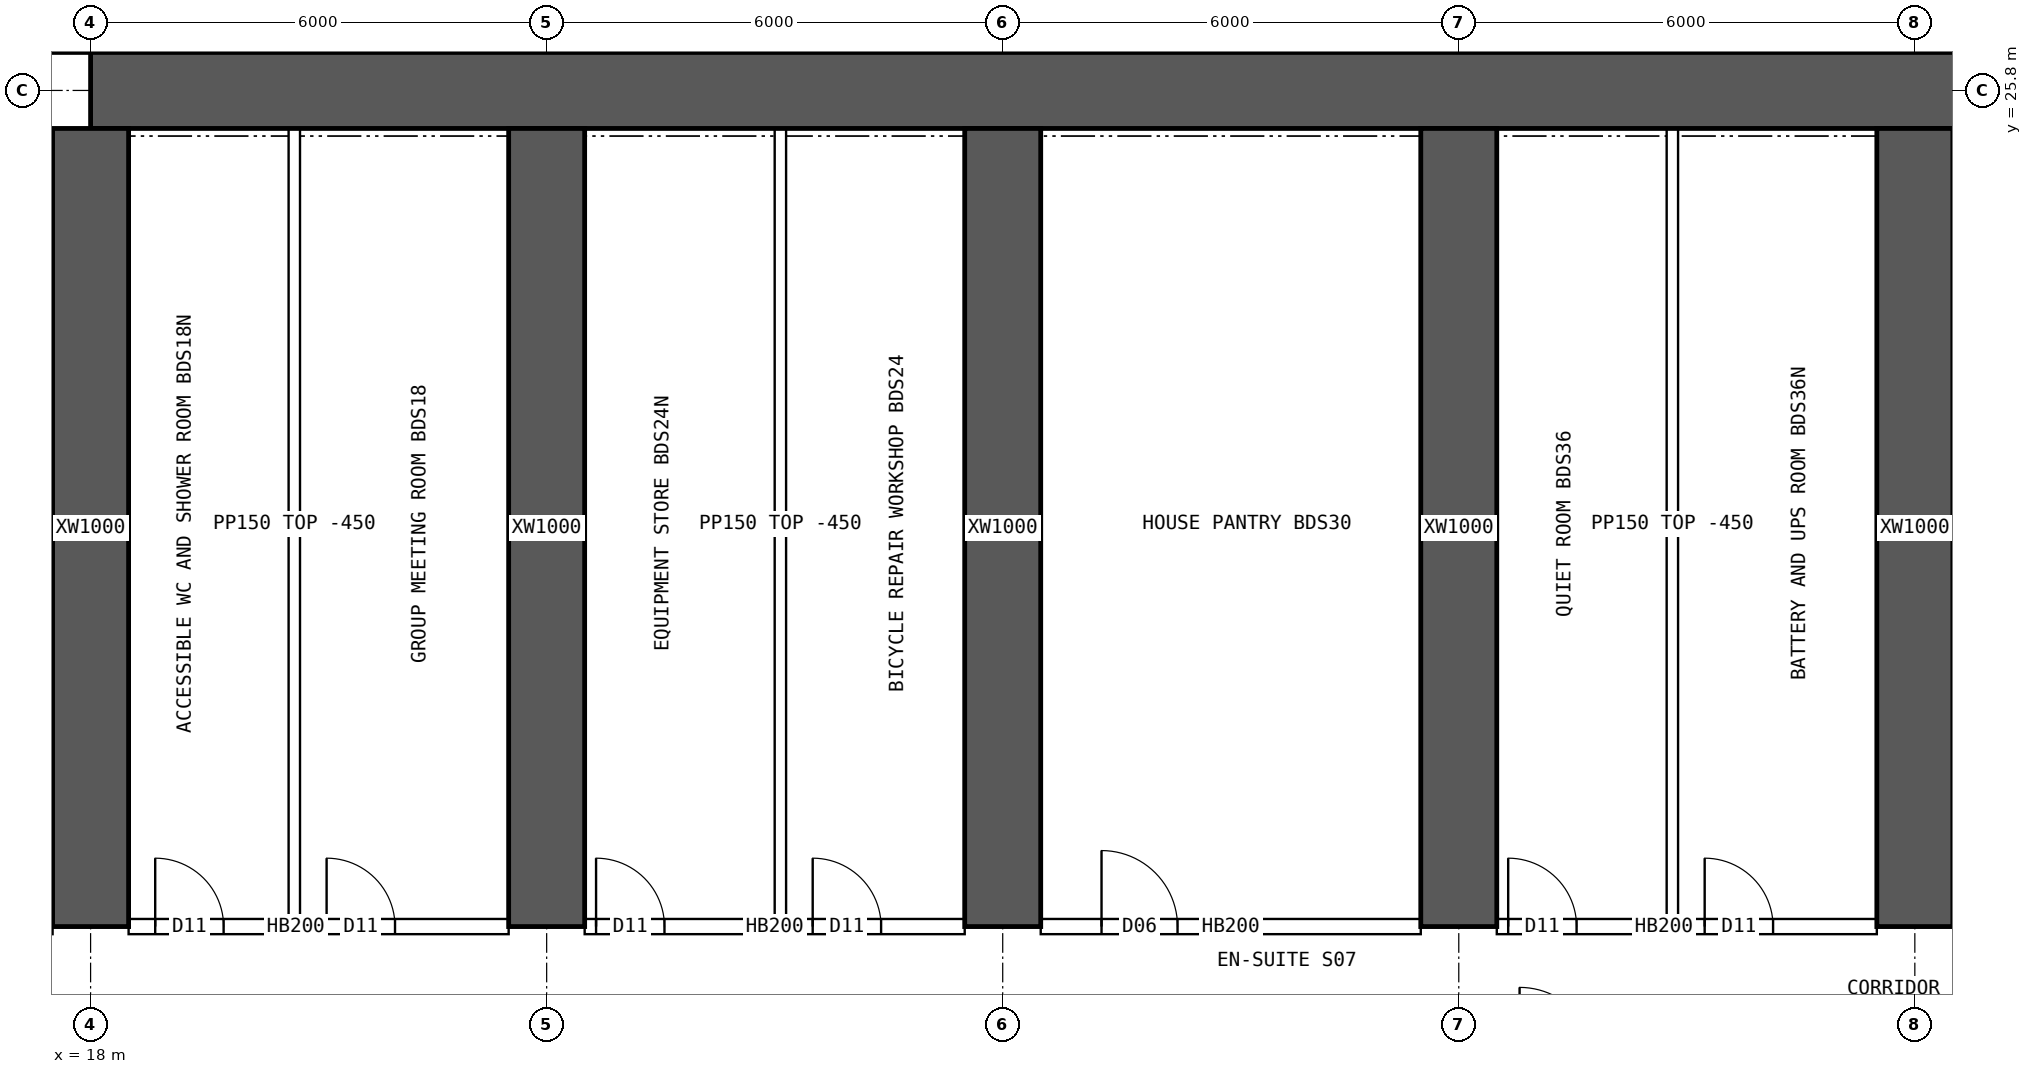
"""IFC4 building model, lengths in metres.
Left out: names, types, materials, properties, quantities, classifications, styles, units other than length and angle.
Written with IfcOpenShell. Run it as: python <this file> out.ifc"""

import sys

from ifc_helpers import new_model, si_unit, direction, frame, frame_2d, origin, place, context, subcontext, project, spatial, rectangle, extrude, element, fill, save


model = new_model("IFC4")
c1 = context("Model", 3, precision=1e-05, world=origin(), true_north=direction((0.0, 1.0)))
c2 = subcontext(c1, "Body", "Model", "MODEL_VIEW")
j1 = project(units=[si_unit("LENGTHUNIT", "METRE"), si_unit("PLANEANGLEUNIT", "RADIAN")], contexts=[c1])
p1 = place(None, origin())
s1 = spatial("IfcSite", under=j1, at=p1, CompositionType="ELEMENT")
p2 = place(p1, origin())
s2 = spatial("IfcBuilding", under=s1, at=p2, CompositionType="ELEMENT")
p3 = place(p2, frame((0.0, 0.0, 35.2)))
s3 = spatial("IfcBuildingStorey", under=s2, at=p3, CompositionType="ELEMENT", Elevation=35.2)
p4 = place(p3, frame((18.0, 25.8, 0.0), z_axis=(0.0, 0.0, 1.0), x_axis=(1.0, 0.0, 0.0)))
e1 = element("IfcWall", 1, at=p4, inside=s3, PredefinedType="SHEAR", context=c2, shape_type="SweptSolid", body=[
    extrude(rectangle(XDim=48.0, YDim=1.0, at=frame_2d((24.0, 0.0))), origin(), (0.0, 0.0, 1.0), 3.75),
])
for number, where, z_axis, x_axis in (
    (2, (18.0, 14.8, 0.0), (0.0, 0.0, 1.0), (0.0, 1.0, 0.0)),
    (3, (24.0, 14.8, 0.0), (0.0, 0.0, 1.0), (0.0, 1.0, 0.0)),
    (4, (30.0, 14.8, 0.0), (0.0, 0.0, 1.0), (0.0, 1.0, 0.0)),
    (5, (36.0, 14.8, 0.0), (0.0, 0.0, 1.0), (0.0, 1.0, 0.0)),
    (6, (42.0, 14.8, 0.0), (0.0, 0.0, 1.0), (0.0, 1.0, 0.0)),
):
    element("IfcWall", number, at=place(p3, frame(where, z_axis=z_axis, x_axis=x_axis)), inside=s3, PredefinedType="SHEAR", context=c2, shape_type="SweptSolid", body=[
        extrude(rectangle(XDim=10.5, YDim=1.0, at=frame_2d((5.25, 0.0))), origin(), (0.0, 0.0, 1.0), 3.75),
    ])
p5 = place(p3, frame((18.5, 14.8, 0.0), z_axis=(0.0, 0.0, 1.0), x_axis=(1.0, 0.0, 0.0)))
e7 = element("IfcWall", 7, at=p5, inside=s3, PredefinedType="SOLIDWALL", context=c2, shape_type="SweptSolid", body=[
    extrude(rectangle(XDim=5.0, YDim=0.2, at=frame_2d((2.5, 0.0))), origin(), (0.0, 0.0, 1.0), 3.3),
])
p6 = place(p5, frame((0.35, 0.0, 0.0)))
e8 = element("IfcOpeningElement", 8, at=p6, cuts=e7, PredefinedType="OPENING", context=c2, shape_type="SweptSolid", body=[
    extrude(rectangle(XDim=0.9, YDim=2.1, at=frame_2d((0.45, 1.05))), frame((0.0, 0.11, 0.0), z_axis=(0.0, -1.0, 0.0), x_axis=(1.0, 0.0, 0.0)), (0.0, 0.0, 1.0), 0.22),
])
p7 = place(p5, frame((2.605, 0.0, 0.0)))
e9 = element("IfcOpeningElement", 9, at=p7, cuts=e7, PredefinedType="OPENING", context=c2, shape_type="SweptSolid", body=[
    extrude(rectangle(XDim=0.9, YDim=2.1, at=frame_2d((0.45, 1.05))), frame((0.0, 0.11, 0.0), z_axis=(0.0, -1.0, 0.0), x_axis=(1.0, 0.0, 0.0)), (0.0, 0.0, 1.0), 0.22),
])
p8 = place(p3, frame((24.5, 14.8, 0.0), z_axis=(0.0, 0.0, 1.0), x_axis=(1.0, 0.0, 0.0)))
e10 = element("IfcWall", 10, at=p8, inside=s3, PredefinedType="SOLIDWALL", context=c2, shape_type="SweptSolid", body=[
    extrude(rectangle(XDim=5.0, YDim=0.2, at=frame_2d((2.5, 0.0))), origin(), (0.0, 0.0, 1.0), 3.3),
])
p9 = place(p8, frame((0.15, 0.0, 0.0)))
e11 = element("IfcOpeningElement", 11, at=p9, cuts=e10, PredefinedType="OPENING", context=c2, shape_type="SweptSolid", body=[
    extrude(rectangle(XDim=0.9, YDim=2.1, at=frame_2d((0.45, 1.05))), frame((0.0, 0.11, 0.0), z_axis=(0.0, -1.0, 0.0), x_axis=(1.0, 0.0, 0.0)), (0.0, 0.0, 1.0), 0.22),
])
p10 = place(p8, frame((3.0, 0.0, 0.0)))
e12 = element("IfcOpeningElement", 12, at=p10, cuts=e10, PredefinedType="OPENING", context=c2, shape_type="SweptSolid", body=[
    extrude(rectangle(XDim=0.9, YDim=2.1, at=frame_2d((0.45, 1.05))), frame((0.0, 0.11, 0.0), z_axis=(0.0, -1.0, 0.0), x_axis=(1.0, 0.0, 0.0)), (0.0, 0.0, 1.0), 0.22),
])
p11 = place(p3, frame((30.5, 14.8, 0.0), z_axis=(0.0, 0.0, 1.0), x_axis=(1.0, 0.0, 0.0)))
e13 = element("IfcWall", 13, at=p11, inside=s3, PredefinedType="SOLIDWALL", context=c2, shape_type="SweptSolid", body=[
    extrude(rectangle(XDim=5.0, YDim=0.2, at=frame_2d((2.5, 0.0))), origin(), (0.0, 0.0, 1.0), 3.3),
])
p12 = place(p11, frame((0.8, 0.0, 0.0)))
e14 = element("IfcOpeningElement", 14, at=p12, cuts=e13, PredefinedType="OPENING", context=c2, shape_type="SweptSolid", body=[
    extrude(rectangle(XDim=1.0, YDim=2.1, at=frame_2d((0.5, 1.05))), frame((0.0, 0.11, 0.0), z_axis=(0.0, -1.0, 0.0), x_axis=(1.0, 0.0, 0.0)), (0.0, 0.0, 1.0), 0.22),
])
p13 = place(p3, frame((36.5, 14.8, 0.0), z_axis=(0.0, 0.0, 1.0), x_axis=(1.0, 0.0, 0.0)))
e15 = element("IfcWall", 15, at=p13, inside=s3, PredefinedType="SOLIDWALL", context=c2, shape_type="SweptSolid", body=[
    extrude(rectangle(XDim=5.0, YDim=0.2, at=frame_2d((2.5, 0.0))), origin(), (0.0, 0.0, 1.0), 3.3),
])
p14 = place(p13, frame((0.15, 0.0, 0.0)))
e16 = element("IfcOpeningElement", 16, at=p14, cuts=e15, PredefinedType="OPENING", context=c2, shape_type="SweptSolid", body=[
    extrude(rectangle(XDim=0.9, YDim=2.1, at=frame_2d((0.45, 1.05))), frame((0.0, 0.11, 0.0), z_axis=(0.0, -1.0, 0.0), x_axis=(1.0, 0.0, 0.0)), (0.0, 0.0, 1.0), 0.22),
])
p15 = place(p13, frame((2.735, 0.0, 0.0)))
e17 = element("IfcOpeningElement", 17, at=p15, cuts=e15, PredefinedType="OPENING", context=c2, shape_type="SweptSolid", body=[
    extrude(rectangle(XDim=0.9, YDim=2.1, at=frame_2d((0.45, 1.05))), frame((0.0, 0.11, 0.0), z_axis=(0.0, -1.0, 0.0), x_axis=(1.0, 0.0, 0.0)), (0.0, 0.0, 1.0), 0.22),
])
for number, where, z_axis, x_axis in (
    (18, (20.68, 14.9, 0.0), (0.0, 0.0, 1.0), (0.0, 1.0, 0.0)),
    (19, (27.075, 14.9, 0.0), (0.0, 0.0, 1.0), (0.0, 1.0, 0.0)),
    (20, (38.81, 14.9, 0.0), (0.0, 0.0, 1.0), (0.0, 1.0, 0.0)),
):
    element("IfcWall", number, at=place(p3, frame(where, z_axis=z_axis, x_axis=x_axis)), inside=s3, PredefinedType="PARTITIONING", context=c2, shape_type="SweptSolid", body=[
        extrude(rectangle(XDim=10.4, YDim=0.15, at=frame_2d((5.2, 0.0))), origin(), (0.0, 0.0, 1.0), 3.3),
    ])
p16 = place(p6, origin())
e21 = element("IfcDoor", 21, at=p16, inside=s3, OperationType="SINGLE_SWING_LEFT", PredefinedType="DOOR", context=c2, shape_type="SweptSolid", body=[
    extrude(rectangle(XDim=0.9, YDim=2.1, at=frame_2d((0.45, 1.05))), frame((0.0, 0.025, 0.0), z_axis=(0.0, -1.0, 0.0), x_axis=(1.0, 0.0, 0.0)), (0.0, 0.0, 1.0), 0.05),
])
fill(e8, e21)
p17 = place(p7, origin())
e22 = element("IfcDoor", 22, at=p17, inside=s3, OperationType="SINGLE_SWING_LEFT", PredefinedType="DOOR", context=c2, shape_type="SweptSolid", body=[
    extrude(rectangle(XDim=0.9, YDim=2.1, at=frame_2d((0.45, 1.05))), frame((0.0, 0.025, 0.0), z_axis=(0.0, -1.0, 0.0), x_axis=(1.0, 0.0, 0.0)), (0.0, 0.0, 1.0), 0.05),
])
fill(e9, e22)
p18 = place(p9, origin())
e23 = element("IfcDoor", 23, at=p18, inside=s3, OperationType="SINGLE_SWING_LEFT", PredefinedType="DOOR", context=c2, shape_type="SweptSolid", body=[
    extrude(rectangle(XDim=0.9, YDim=2.1, at=frame_2d((0.45, 1.05))), frame((0.0, 0.025, 0.0), z_axis=(0.0, -1.0, 0.0), x_axis=(1.0, 0.0, 0.0)), (0.0, 0.0, 1.0), 0.05),
])
fill(e11, e23)
p19 = place(p10, origin())
e24 = element("IfcDoor", 24, at=p19, inside=s3, OperationType="SINGLE_SWING_LEFT", PredefinedType="DOOR", context=c2, shape_type="SweptSolid", body=[
    extrude(rectangle(XDim=0.9, YDim=2.1, at=frame_2d((0.45, 1.05))), frame((0.0, 0.025, 0.0), z_axis=(0.0, -1.0, 0.0), x_axis=(1.0, 0.0, 0.0)), (0.0, 0.0, 1.0), 0.05),
])
fill(e12, e24)
p20 = place(p12, origin())
e25 = element("IfcDoor", 25, at=p20, inside=s3, OperationType="SINGLE_SWING_LEFT", PredefinedType="DOOR", context=c2, shape_type="SweptSolid", body=[
    extrude(rectangle(XDim=1.0, YDim=2.1, at=frame_2d((0.5, 1.05))), frame((0.0, 0.025, 0.0), z_axis=(0.0, -1.0, 0.0), x_axis=(1.0, 0.0, 0.0)), (0.0, 0.0, 1.0), 0.05),
])
fill(e14, e25)
p21 = place(p14, origin())
e26 = element("IfcDoor", 26, at=p21, inside=s3, OperationType="SINGLE_SWING_LEFT", PredefinedType="DOOR", context=c2, shape_type="SweptSolid", body=[
    extrude(rectangle(XDim=0.9, YDim=2.1, at=frame_2d((0.45, 1.05))), frame((0.0, 0.025, 0.0), z_axis=(0.0, -1.0, 0.0), x_axis=(1.0, 0.0, 0.0)), (0.0, 0.0, 1.0), 0.05),
])
fill(e16, e26)
p22 = place(p15, origin())
e27 = element("IfcDoor", 27, at=p22, inside=s3, OperationType="SINGLE_SWING_LEFT", PredefinedType="DOOR", context=c2, shape_type="SweptSolid", body=[
    extrude(rectangle(XDim=0.9, YDim=2.1, at=frame_2d((0.45, 1.05))), frame((0.0, 0.025, 0.0), z_axis=(0.0, -1.0, 0.0), x_axis=(1.0, 0.0, 0.0)), (0.0, 0.0, 1.0), 0.05),
])
fill(e17, e27)
save(model, sys.argv[1])
